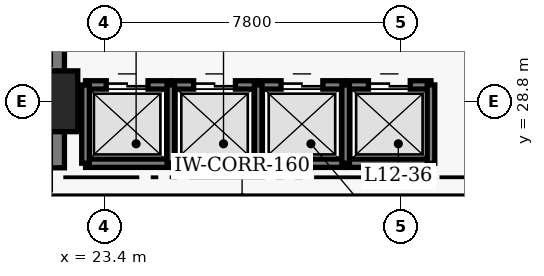
"""IFC4 building model, lengths in metres.
Left out: names, types, materials, properties, quantities, classifications, styles, units other than length and angle.
Written with IfcOpenShell. Run it as: python <this file> out.ifc"""

import sys

from ifc_helpers import new_model, si_unit, direction, frame, frame_2d, origin, origin_2d, place, context, subcontext, project, spatial, rectangle, extrude, element, fill, save


model = new_model("IFC4")
c1 = context("Model", 3, precision=1e-05, world=origin(), true_north=direction((0.0, 1.0)))
c2 = subcontext(c1, "Body", "Model", "MODEL_VIEW")
j1 = project(units=[si_unit("LENGTHUNIT", "METRE"), si_unit("PLANEANGLEUNIT", "RADIAN")], contexts=[c1])
p1 = place(None, origin())
s1 = spatial("IfcSite", under=j1, at=p1, CompositionType="ELEMENT")
p2 = place(p1, origin())
s2 = spatial("IfcBuilding", under=s1, at=p2, CompositionType="ELEMENT")
p3 = place(p2, frame((0.0, 0.0, 52.6)))
s3 = spatial("IfcBuildingStorey", under=s2, at=p3, CompositionType="ELEMENT", Elevation=52.6)
p4 = place(p3, frame((21.9, 27.05, 0.0), z_axis=(0.0, 0.0, 1.0), x_axis=(0.0, 1.0, 0.0)))
e1 = element("IfcWall", 1, at=p4, inside=s3, PredefinedType="SHEAR", context=c2, shape_type="SweptSolid", body=[
    extrude(rectangle(XDim=13.72, YDim=0.9, at=frame_2d((6.86, 0.0))), origin(), (0.0, 0.0, 1.0), 3.8),
])
p5 = place(p3, frame((21.9, 28.8, 0.0), z_axis=(0.0, 0.0, 1.0), x_axis=(1.0, 0.0, 0.0)))
e2 = element("IfcColumn", 2, at=p5, inside=s3, PredefinedType="COLUMN", context=c2, shape_type="SweptSolid", body=[
    extrude(rectangle(XDim=1.6, YDim=1.6, at=origin_2d()), origin(), (0.0, 0.0, 1.0), 3.8),
])
p6 = place(p3, frame((22.905, 29.23, 0.0), z_axis=(0.0, 0.0, 1.0), x_axis=(1.0, 0.0, 0.0)))
e3 = element("IfcWall", 3, at=p6, inside=s3, PredefinedType="SHEAR", context=c2, shape_type="SweptSolid", body=[
    extrude(rectangle(XDim=2.245, YDim=0.22, at=frame_2d((1.123, 0.0))), origin(), (0.0, 0.0, 1.0), 3.8),
])
p7 = place(p6, frame((0.545, 0.0, 0.0)))
e4 = element("IfcOpeningElement", 4, at=p7, cuts=e3, PredefinedType="OPENING", context=c2, shape_type="SweptSolid", body=[
    extrude(rectangle(XDim=1.1, YDim=2.15, at=frame_2d((0.55, 1.075))), frame((0.0, 0.12, 0.0), z_axis=(0.0, -1.0, 0.0), x_axis=(1.0, 0.0, 0.0)), (0.0, 0.0, 1.0), 0.24),
])
p8 = place(p3, frame((22.905, 27.17, 0.0), z_axis=(0.0, 0.0, 1.0), x_axis=(1.0, 0.0, 0.0)))
e5 = element("IfcWall", 5, at=p8, inside=s3, PredefinedType="SHEAR", context=c2, shape_type="SweptSolid", body=[
    extrude(rectangle(XDim=2.245, YDim=0.22, at=frame_2d((1.123, 0.0))), origin(), (0.0, 0.0, 1.0), 3.8),
])
p9 = place(p3, frame((22.905, 27.17, 0.0), z_axis=(0.0, 0.0, 1.0), x_axis=(0.0, 1.0, 0.0)))
e6 = element("IfcWall", 6, at=p9, inside=s3, PredefinedType="SHEAR", context=c2, shape_type="SweptSolid", body=[
    extrude(rectangle(XDim=2.06, YDim=0.2, at=frame_2d((1.03, 0.0))), origin(), (0.0, 0.0, 1.0), 3.8),
])
p10 = place(p3, frame((25.15, 29.23, 0.0), z_axis=(0.0, 0.0, 1.0), x_axis=(1.0, 0.0, 0.0)))
e7 = element("IfcWall", 7, at=p10, inside=s3, PredefinedType="SHEAR", context=c2, shape_type="SweptSolid", body=[
    extrude(rectangle(XDim=2.3, YDim=0.22, at=frame_2d((1.15, 0.0))), origin(), (0.0, 0.0, 1.0), 3.8),
])
p11 = place(p10, frame((0.6, 0.0, 0.0)))
e8 = element("IfcOpeningElement", 8, at=p11, cuts=e7, PredefinedType="OPENING", context=c2, shape_type="SweptSolid", body=[
    extrude(rectangle(XDim=1.1, YDim=2.15, at=frame_2d((0.55, 1.075))), frame((0.0, 0.12, 0.0), z_axis=(0.0, -1.0, 0.0), x_axis=(1.0, 0.0, 0.0)), (0.0, 0.0, 1.0), 0.24),
])
p12 = place(p3, frame((25.15, 27.17, 0.0), z_axis=(0.0, 0.0, 1.0), x_axis=(1.0, 0.0, 0.0)))
e9 = element("IfcWall", 9, at=p12, inside=s3, PredefinedType="SHEAR", context=c2, shape_type="SweptSolid", body=[
    extrude(rectangle(XDim=2.3, YDim=0.22, at=frame_2d((1.15, 0.0))), origin(), (0.0, 0.0, 1.0), 3.8),
])
p13 = place(p3, frame((25.15, 27.17, 0.0), z_axis=(0.0, 0.0, 1.0), x_axis=(0.0, 1.0, 0.0)))
e10 = element("IfcWall", 10, at=p13, inside=s3, PredefinedType="SHEAR", context=c2, shape_type="SweptSolid", body=[
    extrude(rectangle(XDim=2.06, YDim=0.2, at=frame_2d((1.03, 0.0))), origin(), (0.0, 0.0, 1.0), 3.8),
])
p14 = place(p3, frame((27.45, 29.23, 0.0), z_axis=(0.0, 0.0, 1.0), x_axis=(1.0, 0.0, 0.0)))
e11 = element("IfcWall", 11, at=p14, inside=s3, PredefinedType="SHEAR", context=c2, shape_type="SweptSolid", body=[
    extrude(rectangle(XDim=2.3, YDim=0.22, at=frame_2d((1.15, 0.0))), origin(), (0.0, 0.0, 1.0), 3.8),
])
p15 = place(p14, frame((0.6, 0.0, 0.0)))
e12 = element("IfcOpeningElement", 12, at=p15, cuts=e11, PredefinedType="OPENING", context=c2, shape_type="SweptSolid", body=[
    extrude(rectangle(XDim=1.1, YDim=2.15, at=frame_2d((0.55, 1.075))), frame((0.0, 0.12, 0.0), z_axis=(0.0, -1.0, 0.0), x_axis=(1.0, 0.0, 0.0)), (0.0, 0.0, 1.0), 0.24),
])
p16 = place(p3, frame((27.45, 27.17, 0.0), z_axis=(0.0, 0.0, 1.0), x_axis=(1.0, 0.0, 0.0)))
e13 = element("IfcWall", 13, at=p16, inside=s3, PredefinedType="SHEAR", context=c2, shape_type="SweptSolid", body=[
    extrude(rectangle(XDim=2.3, YDim=0.22, at=frame_2d((1.15, 0.0))), origin(), (0.0, 0.0, 1.0), 3.8),
])
p17 = place(p3, frame((27.45, 27.17, 0.0), z_axis=(0.0, 0.0, 1.0), x_axis=(0.0, 1.0, 0.0)))
e14 = element("IfcWall", 14, at=p17, inside=s3, PredefinedType="SHEAR", context=c2, shape_type="SweptSolid", body=[
    extrude(rectangle(XDim=2.06, YDim=0.2, at=frame_2d((1.03, 0.0))), origin(), (0.0, 0.0, 1.0), 3.8),
])
p18 = place(p3, frame((29.75, 29.23, 0.0), z_axis=(0.0, 0.0, 1.0), x_axis=(1.0, 0.0, 0.0)))
e15 = element("IfcWall", 15, at=p18, inside=s3, PredefinedType="SHEAR", context=c2, shape_type="SweptSolid", body=[
    extrude(rectangle(XDim=2.245, YDim=0.22, at=frame_2d((1.123, 0.0))), origin(), (0.0, 0.0, 1.0), 3.8),
])
p19 = place(p18, frame((0.6, 0.0, 0.0)))
e16 = element("IfcOpeningElement", 16, at=p19, cuts=e15, PredefinedType="OPENING", context=c2, shape_type="SweptSolid", body=[
    extrude(rectangle(XDim=1.1, YDim=2.15, at=frame_2d((0.55, 1.075))), frame((0.0, 0.12, 0.0), z_axis=(0.0, -1.0, 0.0), x_axis=(1.0, 0.0, 0.0)), (0.0, 0.0, 1.0), 0.24),
])
p20 = place(p3, frame((29.75, 27.17, 0.0), z_axis=(0.0, 0.0, 1.0), x_axis=(1.0, 0.0, 0.0)))
e17 = element("IfcWall", 17, at=p20, inside=s3, PredefinedType="SHEAR", context=c2, shape_type="SweptSolid", body=[
    extrude(rectangle(XDim=2.245, YDim=0.22, at=frame_2d((1.123, 0.0))), origin(), (0.0, 0.0, 1.0), 3.8),
])
for number, where, z_axis, x_axis in (
    (18, (29.75, 27.17, 0.0), (0.0, 0.0, 1.0), (0.0, 1.0, 0.0)),
    (19, (31.995, 27.17, 0.0), (0.0, 0.0, 1.0), (0.0, 1.0, 0.0)),
):
    element("IfcWall", number, at=place(p3, frame(where, z_axis=z_axis, x_axis=x_axis)), inside=s3, PredefinedType="SHEAR", context=c2, shape_type="SweptSolid", body=[
        extrude(rectangle(XDim=2.06, YDim=0.2, at=frame_2d((1.03, 0.0))), origin(), (0.0, 0.0, 1.0), 3.8),
    ])
p21 = place(p3, frame((20.4, 26.26, 0.0), z_axis=(0.0, 0.0, 1.0), x_axis=(1.0, 0.0, 0.0)))
e20 = element("IfcWall", 20, at=p21, inside=s3, PredefinedType="PARTITIONING", context=c2, shape_type="SweptSolid", body=[
    extrude(rectangle(XDim=13.25, YDim=0.16, at=frame_2d((6.625, 0.0))), origin(), (0.0, 0.0, 1.0), 3.54),
])
p22 = place(p7, origin())
e21 = element("IfcDoor", 21, at=p22, inside=s3, OperationType="DOUBLE_DOOR_SLIDING", PredefinedType="DOOR", context=c2, shape_type="SweptSolid", body=[
    extrude(rectangle(XDim=1.1, YDim=2.15, at=frame_2d((0.55, 1.075))), frame((0.0, 0.025, 0.0), z_axis=(0.0, -1.0, 0.0), x_axis=(1.0, 0.0, 0.0)), (0.0, 0.0, 1.0), 0.05),
])
fill(e4, e21)
p23 = place(p11, origin())
e22 = element("IfcDoor", 22, at=p23, inside=s3, OperationType="DOUBLE_DOOR_SLIDING", PredefinedType="DOOR", context=c2, shape_type="SweptSolid", body=[
    extrude(rectangle(XDim=1.1, YDim=2.15, at=frame_2d((0.55, 1.075))), frame((0.0, 0.025, 0.0), z_axis=(0.0, -1.0, 0.0), x_axis=(1.0, 0.0, 0.0)), (0.0, 0.0, 1.0), 0.05),
])
fill(e8, e22)
p24 = place(p15, origin())
e23 = element("IfcDoor", 23, at=p24, inside=s3, OperationType="DOUBLE_DOOR_SLIDING", PredefinedType="DOOR", context=c2, shape_type="SweptSolid", body=[
    extrude(rectangle(XDim=1.1, YDim=2.15, at=frame_2d((0.55, 1.075))), frame((0.0, 0.025, 0.0), z_axis=(0.0, -1.0, 0.0), x_axis=(1.0, 0.0, 0.0)), (0.0, 0.0, 1.0), 0.05),
])
fill(e12, e23)
p25 = place(p19, origin())
e24 = element("IfcDoor", 24, at=p25, inside=s3, OperationType="DOUBLE_DOOR_SLIDING", PredefinedType="DOOR", context=c2, shape_type="SweptSolid", body=[
    extrude(rectangle(XDim=1.1, YDim=2.15, at=frame_2d((0.55, 1.075))), frame((0.0, 0.025, 0.0), z_axis=(0.0, -1.0, 0.0), x_axis=(1.0, 0.0, 0.0)), (0.0, 0.0, 1.0), 0.05),
])
fill(e16, e24)
save(model, sys.argv[1])
